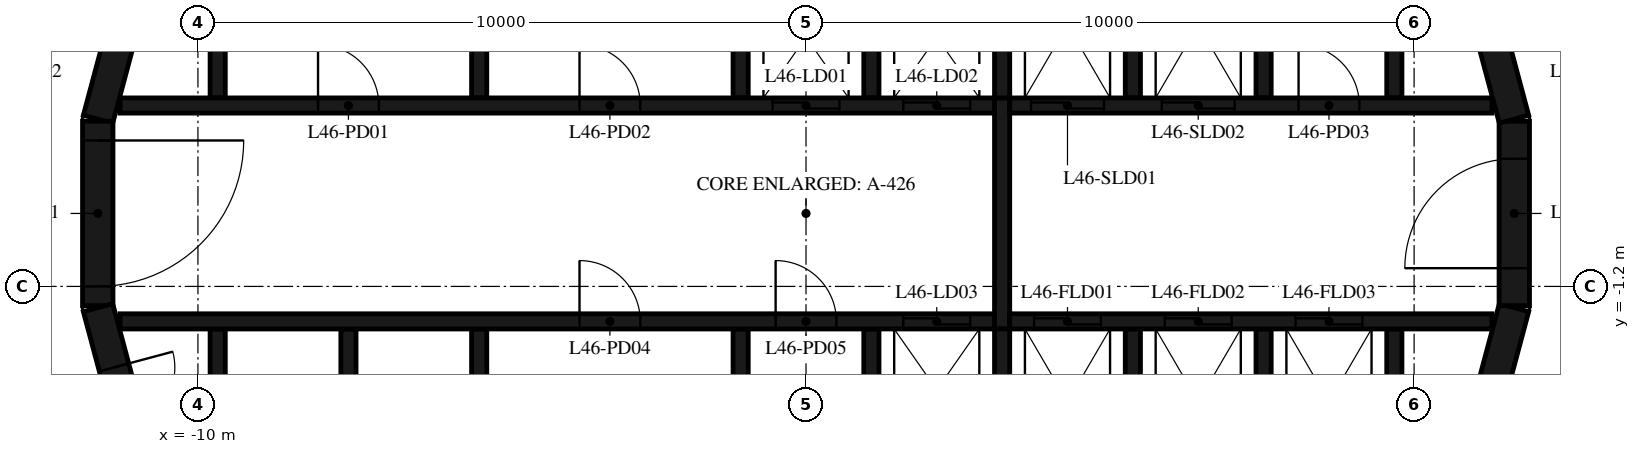
"""IFC4 building model, lengths in metres.
Left out: names, types, materials, properties, quantities, classifications, styles, units other than length and angle.
Written with IfcOpenShell. Run it as: python <this file> out.ifc"""

import sys

from ifc_helpers import new_model, si_unit, direction, frame, frame_2d, origin, place, context, subcontext, project, spatial, polyline, rectangle, outline, extrude, element, fill, save


model = new_model("IFC4")
c1 = context("Model", 3, precision=1e-05, world=origin(), true_north=direction((0.0, 1.0)))
c2 = subcontext(c1, "Body", "Model", "MODEL_VIEW")
j1 = project(units=[si_unit("LENGTHUNIT", "METRE"), si_unit("PLANEANGLEUNIT", "RADIAN")], contexts=[c1])
p1 = place(None, origin())
s1 = spatial("IfcSite", under=j1, at=p1, CompositionType="ELEMENT")
p2 = place(p1, origin())
s2 = spatial("IfcBuilding", under=s1, at=p2, CompositionType="ELEMENT")
p3 = place(p2, frame((0.0, 0.0, 183.2)))
s3 = spatial("IfcBuildingStorey", under=s2, at=p3, CompositionType="ELEMENT", Elevation=183.2)
p4 = place(p3, frame((10.858, -4.479, 0.0), z_axis=(0.0, 0.0, 1.0), x_axis=(0.258734743916, 0.965948410781, 0.0)))
e1 = element("IfcWall", 1, at=p4, inside=s3, PredefinedType="SHEAR", context=c2, shape_type="SweptSolid", body=[
    extrude(rectangle(XDim=3.033, YDim=0.5, at=frame_2d((1.516, 0.0))), origin(), (0.0, 0.0, 1.0), 4.75),
])
p5 = place(p3, frame((11.647, -1.516, 0.0), z_axis=(0.0, 0.0, 1.0), x_axis=(0.0, 1.0, 0.0)))
e2 = element("IfcWall", 2, at=p5, inside=s3, PredefinedType="SHEAR", context=c2, shape_type="SweptSolid", body=[
    extrude(rectangle(XDim=3.033, YDim=0.5, at=frame_2d((1.516, 0.0))), origin(), (0.0, 0.0, 1.0), 4.75),
])
p6 = place(p5, frame((0.616, 0.0, 0.0)))
e3 = element("IfcOpeningElement", 3, at=p6, cuts=e2, PredefinedType="OPENING", context=c2, shape_type="SweptSolid", body=[
    extrude(rectangle(XDim=1.8, YDim=2.1, at=frame_2d((0.9, 1.05))), frame((0.0, 0.26, 0.0), z_axis=(0.0, -1.0, 0.0), x_axis=(1.0, 0.0, 0.0)), (0.0, 0.0, 1.0), 0.52),
])
for number, where, z_axis, x_axis in (
    (4, (11.643, 1.55, 0.0), (0.0, 0.0, 1.0), (-0.259, 0.966, 0.0)),
    (5, (-10.858, 4.479, 0.0), (0.0, 0.0, 1.0), (-0.259, -0.966, 0.0)),
):
    element("IfcWall", number, at=place(p3, frame(where, z_axis=z_axis, x_axis=x_axis)), inside=s3, PredefinedType="SHEAR", context=c2, shape_type="SweptSolid", body=[
        extrude(rectangle(XDim=3.033, YDim=0.5, at=frame_2d((1.516, 0.0))), origin(), (0.0, 0.0, 1.0), 4.75),
    ])
p7 = place(p3, frame((-11.647, 1.516, 0.0), z_axis=(0.0, 0.0, 1.0), x_axis=(0.0, -1.0, 0.0)))
e6 = element("IfcWall", 6, at=p7, inside=s3, PredefinedType="SHEAR", context=c2, shape_type="SweptSolid", body=[
    extrude(rectangle(XDim=3.033, YDim=0.5, at=frame_2d((1.516, 0.0))), origin(), (0.0, 0.0, 1.0), 4.75),
])
p8 = place(p7, frame((0.316, 0.0, 0.0)))
e7 = element("IfcOpeningElement", 7, at=p8, cuts=e6, PredefinedType="OPENING", context=c2, shape_type="SweptSolid", body=[
    extrude(rectangle(XDim=2.4, YDim=2.1, at=frame_2d((1.2, 1.05))), frame((0.0, 0.26, 0.0), z_axis=(0.0, -1.0, 0.0), x_axis=(1.0, 0.0, 0.0)), (0.0, 0.0, 1.0), 0.52),
])
p9 = place(p3, frame((-11.643, -1.55, 0.0), z_axis=(0.0, 0.0, 1.0), x_axis=(0.258734743916, -0.965948410781, 0.0)))
e8 = element("IfcWall", 8, at=p9, inside=s3, PredefinedType="SHEAR", context=c2, shape_type="SweptSolid", body=[
    extrude(rectangle(XDim=3.033, YDim=0.5, at=frame_2d((1.516, 0.0))), origin(), (0.0, 0.0, 1.0), 4.75),
])
p10 = place(p9, frame((1.016, 0.0, 0.0)))
e9 = element("IfcOpeningElement", 9, at=p10, cuts=e8, PredefinedType="OPENING", context=c2, shape_type="SweptSolid", body=[
    extrude(rectangle(XDim=1.0, YDim=2.4, at=frame_2d((0.5, 1.2))), frame((0.0, 0.26, 0.0), z_axis=(0.0, -1.0, 0.0), x_axis=(1.0, 0.0, 0.0)), (0.0, 0.0, 1.0), 0.52),
])
p11 = place(p3, origin())
e10 = element("IfcWall", 10, at=p11, inside=s3, PredefinedType="SHEAR", context=c2, shape_type="SweptSolid", body=[
    extrude(outline(polyline([(-9.55, 4.8), (-5.5, 4.8), (-5.5, 1.9), (-5.25, 1.9), (-5.25, 4.8), (-1.2, 4.8), (-1.2, 1.9), (-0.95, 1.9), (-0.95, 4.8), (0.95, 4.8), (0.95, 1.9), (1.2, 1.9), (1.2, 4.8), (3.1, 4.8), (3.1, 1.9), (3.35, 1.9), (3.35, 4.8), (5.25, 4.8), (5.25, 1.9), (5.5, 1.9), (5.5, 4.8), (7.4, 4.8), (7.4, 1.9), (7.65, 1.9), (7.65, 4.8), (9.55, 4.8), (9.55, 1.9), (9.8, 1.9), (9.8, 4.8), (9.8, 5.05), (-9.8, 5.05), (-9.8, 4.8), (-9.8, 1.9), (-9.55, 1.9), (-9.55, 4.8)])), origin(), (0.0, 0.0, 1.0), 4.75),
])
p12 = place(p3, origin())
e11 = element("IfcWall", 11, at=p12, inside=s3, PredefinedType="SHEAR", context=c2, shape_type="SweptSolid", body=[
    extrude(outline(polyline([(9.8, -5.05), (9.8, -4.8), (9.8, -1.9), (9.55, -1.9), (9.55, -4.8), (7.65, -4.8), (7.65, -1.9), (7.4, -1.9), (7.4, -4.8), (5.5, -4.8), (5.5, -1.9), (5.25, -1.9), (5.25, -4.8), (3.35, -4.8), (3.35, -1.9), (3.1, -1.9), (3.1, -4.8), (1.2, -4.8), (1.2, -1.9), (0.95, -1.9), (0.95, -4.8), (-0.95, -4.8), (-0.95, -1.9), (-1.2, -1.9), (-1.2, -4.8), (-5.25, -4.8), (-5.25, -1.9), (-5.5, -1.9), (-5.5, -4.8), (-7.4, -4.8), (-7.4, -1.9), (-7.65, -1.9), (-7.65, -4.8), (-9.55, -4.8), (-9.55, -1.9), (-9.8, -1.9), (-9.8, -4.8), (-9.8, -5.05), (9.8, -5.05)])), origin(), (0.0, 0.0, 1.0), 4.75),
])
p13 = place(p3, frame((-11.28, 1.775, 0.0), z_axis=(0.0, 0.0, 1.0), x_axis=(1.0, 0.0, 0.0)))
e12 = element("IfcWall", 12, at=p13, inside=s3, PredefinedType="SHEAR", context=c2, shape_type="SweptSolid", body=[
    extrude(rectangle(XDim=14.38, YDim=0.25, at=frame_2d((7.19, 0.0))), origin(), (0.0, 0.0, 1.0), 4.75),
])
p14 = place(p13, frame((10.73, 0.0, 0.0)))
e13 = element("IfcOpeningElement", 13, at=p14, cuts=e12, PredefinedType="OPENING", context=c2, shape_type="SweptSolid", body=[
    extrude(rectangle(XDim=1.1, YDim=2.1, at=frame_2d((0.55, 1.05))), frame((0.0, 0.135, 0.0), z_axis=(0.0, -1.0, 0.0), x_axis=(1.0, 0.0, 0.0)), (0.0, 0.0, 1.0), 0.27),
])
p15 = place(p13, frame((12.88, 0.0, 0.0)))
e14 = element("IfcOpeningElement", 14, at=p15, cuts=e12, PredefinedType="OPENING", context=c2, shape_type="SweptSolid", body=[
    extrude(rectangle(XDim=1.1, YDim=2.1, at=frame_2d((0.55, 1.05))), frame((0.0, 0.135, 0.0), z_axis=(0.0, -1.0, 0.0), x_axis=(1.0, 0.0, 0.0)), (0.0, 0.0, 1.0), 0.27),
])
p16 = place(p13, frame((3.255, 0.0, 0.0)))
e15 = element("IfcOpeningElement", 15, at=p16, cuts=e12, PredefinedType="OPENING", context=c2, shape_type="SweptSolid", body=[
    extrude(rectangle(XDim=1.0, YDim=2.4, at=frame_2d((0.5, 1.2))), frame((0.0, 0.135, 0.0), z_axis=(0.0, -1.0, 0.0), x_axis=(1.0, 0.0, 0.0)), (0.0, 0.0, 1.0), 0.27),
])
p17 = place(p13, frame((7.555, 0.0, 0.0)))
e16 = element("IfcOpeningElement", 16, at=p17, cuts=e12, PredefinedType="OPENING", context=c2, shape_type="SweptSolid", body=[
    extrude(rectangle(XDim=1.0, YDim=2.4, at=frame_2d((0.5, 1.2))), frame((0.0, 0.135, 0.0), z_axis=(0.0, -1.0, 0.0), x_axis=(1.0, 0.0, 0.0)), (0.0, 0.0, 1.0), 0.27),
])
p18 = place(p3, frame((3.35, 1.775, 0.0), z_axis=(0.0, 0.0, 1.0), x_axis=(1.0, 0.0, 0.0)))
e17 = element("IfcWall", 17, at=p18, inside=s3, PredefinedType="SHEAR", context=c2, shape_type="SweptSolid", body=[
    extrude(rectangle(XDim=7.93, YDim=0.25, at=frame_2d((3.965, 0.0))), origin(), (0.0, 0.0, 1.0), 4.75),
])
p19 = place(p18, frame((0.35, 0.0, 0.0)))
e18 = element("IfcOpeningElement", 18, at=p19, cuts=e17, PredefinedType="OPENING", context=c2, shape_type="SweptSolid", body=[
    extrude(rectangle(XDim=1.2, YDim=2.4, at=frame_2d((0.6, 1.2))), frame((0.0, 0.135, 0.0), z_axis=(0.0, -1.0, 0.0), x_axis=(1.0, 0.0, 0.0)), (0.0, 0.0, 1.0), 0.27),
])
p20 = place(p18, frame((2.5, 0.0, 0.0)))
e19 = element("IfcOpeningElement", 19, at=p20, cuts=e17, PredefinedType="OPENING", context=c2, shape_type="SweptSolid", body=[
    extrude(rectangle(XDim=1.2, YDim=2.4, at=frame_2d((0.6, 1.2))), frame((0.0, 0.135, 0.0), z_axis=(0.0, -1.0, 0.0), x_axis=(1.0, 0.0, 0.0)), (0.0, 0.0, 1.0), 0.27),
])
p21 = place(p18, frame((4.75, 0.0, 0.0)))
e20 = element("IfcOpeningElement", 20, at=p21, cuts=e17, PredefinedType="OPENING", context=c2, shape_type="SweptSolid", body=[
    extrude(rectangle(XDim=1.0, YDim=2.4, at=frame_2d((0.5, 1.2))), frame((0.0, 0.135, 0.0), z_axis=(0.0, -1.0, 0.0), x_axis=(1.0, 0.0, 0.0)), (0.0, 0.0, 1.0), 0.27),
])
p22 = place(p3, frame((-11.28, -1.775, 0.0), z_axis=(0.0, 0.0, 1.0), x_axis=(1.0, 0.0, 0.0)))
e21 = element("IfcWall", 21, at=p22, inside=s3, PredefinedType="SHEAR", context=c2, shape_type="SweptSolid", body=[
    extrude(rectangle(XDim=14.38, YDim=0.25, at=frame_2d((7.19, 0.0))), origin(), (0.0, 0.0, 1.0), 4.75),
])
p23 = place(p22, frame((12.88, 0.0, 0.0)))
e22 = element("IfcOpeningElement", 22, at=p23, cuts=e21, PredefinedType="OPENING", context=c2, shape_type="SweptSolid", body=[
    extrude(rectangle(XDim=1.1, YDim=2.1, at=frame_2d((0.55, 1.05))), frame((0.0, 0.135, 0.0), z_axis=(0.0, -1.0, 0.0), x_axis=(1.0, 0.0, 0.0)), (0.0, 0.0, 1.0), 0.27),
])
p24 = place(p22, frame((7.555, 0.0, 0.0)))
e23 = element("IfcOpeningElement", 23, at=p24, cuts=e21, PredefinedType="OPENING", context=c2, shape_type="SweptSolid", body=[
    extrude(rectangle(XDim=1.0, YDim=2.4, at=frame_2d((0.5, 1.2))), frame((0.0, 0.135, 0.0), z_axis=(0.0, -1.0, 0.0), x_axis=(1.0, 0.0, 0.0)), (0.0, 0.0, 1.0), 0.27),
])
p25 = place(p22, frame((10.78, 0.0, 0.0)))
e24 = element("IfcOpeningElement", 24, at=p25, cuts=e21, PredefinedType="OPENING", context=c2, shape_type="SweptSolid", body=[
    extrude(rectangle(XDim=1.0, YDim=2.4, at=frame_2d((0.5, 1.2))), frame((0.0, 0.135, 0.0), z_axis=(0.0, -1.0, 0.0), x_axis=(1.0, 0.0, 0.0)), (0.0, 0.0, 1.0), 0.27),
])
p26 = place(p3, frame((3.35, -1.775, 0.0), z_axis=(0.0, 0.0, 1.0), x_axis=(1.0, 0.0, 0.0)))
e25 = element("IfcWall", 25, at=p26, inside=s3, PredefinedType="SHEAR", context=c2, shape_type="SweptSolid", body=[
    extrude(rectangle(XDim=7.93, YDim=0.25, at=frame_2d((3.965, 0.0))), origin(), (0.0, 0.0, 1.0), 4.75),
])
p27 = place(p26, frame((0.4, 0.0, 0.0)))
e26 = element("IfcOpeningElement", 26, at=p27, cuts=e25, PredefinedType="OPENING", context=c2, shape_type="SweptSolid", body=[
    extrude(rectangle(XDim=1.1, YDim=2.4, at=frame_2d((0.55, 1.2))), frame((0.0, 0.135, 0.0), z_axis=(0.0, -1.0, 0.0), x_axis=(1.0, 0.0, 0.0)), (0.0, 0.0, 1.0), 0.27),
])
p28 = place(p26, frame((2.55, 0.0, 0.0)))
e27 = element("IfcOpeningElement", 27, at=p28, cuts=e25, PredefinedType="OPENING", context=c2, shape_type="SweptSolid", body=[
    extrude(rectangle(XDim=1.1, YDim=2.4, at=frame_2d((0.55, 1.2))), frame((0.0, 0.135, 0.0), z_axis=(0.0, -1.0, 0.0), x_axis=(1.0, 0.0, 0.0)), (0.0, 0.0, 1.0), 0.27),
])
p29 = place(p26, frame((4.7, 0.0, 0.0)))
e28 = element("IfcOpeningElement", 28, at=p29, cuts=e25, PredefinedType="OPENING", context=c2, shape_type="SweptSolid", body=[
    extrude(rectangle(XDim=1.1, YDim=2.4, at=frame_2d((0.55, 1.2))), frame((0.0, 0.135, 0.0), z_axis=(0.0, -1.0, 0.0), x_axis=(1.0, 0.0, 0.0)), (0.0, 0.0, 1.0), 0.27),
])
p30 = place(p3, frame((3.225, -1.9, 0.0), z_axis=(0.0, 0.0, 1.0), x_axis=(0.0, 1.0, 0.0)))
e29 = element("IfcWall", 29, at=p30, inside=s3, PredefinedType="SHEAR", context=c2, shape_type="SweptSolid", body=[
    extrude(rectangle(XDim=3.8, YDim=0.25, at=frame_2d((1.9, 0.0))), origin(), (0.0, 0.0, 1.0), 4.75),
])
p31 = place(p8, origin())
e30 = element("IfcDoor", 30, at=p31, inside=s3, OperationType="DOUBLE_DOOR_SINGLE_SWING", PredefinedType="DOOR", context=c2, shape_type="SweptSolid", body=[
    extrude(rectangle(XDim=2.4, YDim=2.1, at=frame_2d((1.2, 1.05))), frame((0.0, 0.025, 0.0), z_axis=(0.0, -1.0, 0.0), x_axis=(1.0, 0.0, 0.0)), (0.0, 0.0, 1.0), 0.05),
])
fill(e7, e30)
p32 = place(p6, origin())
e31 = element("IfcDoor", 31, at=p32, inside=s3, OperationType="DOUBLE_DOOR_SINGLE_SWING", PredefinedType="DOOR", context=c2, shape_type="SweptSolid", body=[
    extrude(rectangle(XDim=1.8, YDim=2.1, at=frame_2d((0.9, 1.05))), frame((0.0, 0.025, 0.0), z_axis=(0.0, -1.0, 0.0), x_axis=(1.0, 0.0, 0.0)), (0.0, 0.0, 1.0), 0.05),
])
fill(e3, e31)
p33 = place(p14, origin())
e32 = element("IfcDoor", 32, at=p33, inside=s3, OperationType="DOUBLE_DOOR_SLIDING", PredefinedType="DOOR", context=c2, shape_type="SweptSolid", body=[
    extrude(rectangle(XDim=1.1, YDim=2.1, at=frame_2d((0.55, 1.05))), frame((0.0, 0.025, 0.0), z_axis=(0.0, -1.0, 0.0), x_axis=(1.0, 0.0, 0.0)), (0.0, 0.0, 1.0), 0.05),
])
fill(e13, e32)
p34 = place(p15, origin())
e33 = element("IfcDoor", 33, at=p34, inside=s3, OperationType="DOUBLE_DOOR_SLIDING", PredefinedType="DOOR", context=c2, shape_type="SweptSolid", body=[
    extrude(rectangle(XDim=1.1, YDim=2.1, at=frame_2d((0.55, 1.05))), frame((0.0, 0.025, 0.0), z_axis=(0.0, -1.0, 0.0), x_axis=(1.0, 0.0, 0.0)), (0.0, 0.0, 1.0), 0.05),
])
fill(e14, e33)
p35 = place(p19, origin())
e34 = element("IfcDoor", 34, at=p35, inside=s3, OperationType="DOUBLE_DOOR_SLIDING", PredefinedType="DOOR", context=c2, shape_type="SweptSolid", body=[
    extrude(rectangle(XDim=1.2, YDim=2.4, at=frame_2d((0.6, 1.2))), frame((0.0, 0.025, 0.0), z_axis=(0.0, -1.0, 0.0), x_axis=(1.0, 0.0, 0.0)), (0.0, 0.0, 1.0), 0.05),
])
fill(e18, e34)
p36 = place(p20, origin())
e35 = element("IfcDoor", 35, at=p36, inside=s3, OperationType="DOUBLE_DOOR_SLIDING", PredefinedType="DOOR", context=c2, shape_type="SweptSolid", body=[
    extrude(rectangle(XDim=1.2, YDim=2.4, at=frame_2d((0.6, 1.2))), frame((0.0, 0.025, 0.0), z_axis=(0.0, -1.0, 0.0), x_axis=(1.0, 0.0, 0.0)), (0.0, 0.0, 1.0), 0.05),
])
fill(e19, e35)
p37 = place(p23, origin())
e36 = element("IfcDoor", 36, at=p37, inside=s3, OperationType="DOUBLE_DOOR_SLIDING", PredefinedType="DOOR", context=c2, shape_type="SweptSolid", body=[
    extrude(rectangle(XDim=1.1, YDim=2.1, at=frame_2d((0.55, 1.05))), frame((0.0, 0.025, 0.0), z_axis=(0.0, -1.0, 0.0), x_axis=(1.0, 0.0, 0.0)), (0.0, 0.0, 1.0), 0.05),
])
fill(e22, e36)
p38 = place(p27, origin())
e37 = element("IfcDoor", 37, at=p38, inside=s3, OperationType="DOUBLE_DOOR_SLIDING", PredefinedType="DOOR", context=c2, shape_type="SweptSolid", body=[
    extrude(rectangle(XDim=1.1, YDim=2.4, at=frame_2d((0.55, 1.2))), frame((0.0, 0.025, 0.0), z_axis=(0.0, -1.0, 0.0), x_axis=(1.0, 0.0, 0.0)), (0.0, 0.0, 1.0), 0.05),
])
fill(e26, e37)
p39 = place(p28, origin())
e38 = element("IfcDoor", 38, at=p39, inside=s3, OperationType="DOUBLE_DOOR_SLIDING", PredefinedType="DOOR", context=c2, shape_type="SweptSolid", body=[
    extrude(rectangle(XDim=1.1, YDim=2.4, at=frame_2d((0.55, 1.2))), frame((0.0, 0.025, 0.0), z_axis=(0.0, -1.0, 0.0), x_axis=(1.0, 0.0, 0.0)), (0.0, 0.0, 1.0), 0.05),
])
fill(e27, e38)
p40 = place(p29, origin())
e39 = element("IfcDoor", 39, at=p40, inside=s3, OperationType="DOUBLE_DOOR_SLIDING", PredefinedType="DOOR", context=c2, shape_type="SweptSolid", body=[
    extrude(rectangle(XDim=1.1, YDim=2.4, at=frame_2d((0.55, 1.2))), frame((0.0, 0.025, 0.0), z_axis=(0.0, -1.0, 0.0), x_axis=(1.0, 0.0, 0.0)), (0.0, 0.0, 1.0), 0.05),
])
fill(e28, e39)
p41 = place(p16, origin())
e40 = element("IfcDoor", 40, at=p41, inside=s3, OperationType="SINGLE_SWING_LEFT", PredefinedType="DOOR", context=c2, shape_type="SweptSolid", body=[
    extrude(rectangle(XDim=1.0, YDim=2.4, at=frame_2d((0.5, 1.2))), frame((0.0, 0.025, 0.0), z_axis=(0.0, -1.0, 0.0), x_axis=(1.0, 0.0, 0.0)), (0.0, 0.0, 1.0), 0.05),
])
fill(e15, e40)
p42 = place(p17, origin())
e41 = element("IfcDoor", 41, at=p42, inside=s3, OperationType="SINGLE_SWING_RIGHT", PredefinedType="DOOR", context=c2, shape_type="SweptSolid", body=[
    extrude(rectangle(XDim=1.0, YDim=2.4, at=frame_2d((0.5, 1.2))), frame((0.0, 0.025, 0.0), z_axis=(0.0, -1.0, 0.0), x_axis=(1.0, 0.0, 0.0)), (0.0, 0.0, 1.0), 0.05),
])
fill(e16, e41)
p43 = place(p21, origin())
e42 = element("IfcDoor", 42, at=p43, inside=s3, OperationType="SINGLE_SWING_LEFT", PredefinedType="DOOR", context=c2, shape_type="SweptSolid", body=[
    extrude(rectangle(XDim=1.0, YDim=2.4, at=frame_2d((0.5, 1.2))), frame((0.0, 0.025, 0.0), z_axis=(0.0, -1.0, 0.0), x_axis=(1.0, 0.0, 0.0)), (0.0, 0.0, 1.0), 0.05),
])
fill(e20, e42)
p44 = place(p24, origin())
e43 = element("IfcDoor", 43, at=p44, inside=s3, OperationType="SINGLE_SWING_RIGHT", PredefinedType="DOOR", context=c2, shape_type="SweptSolid", body=[
    extrude(rectangle(XDim=1.0, YDim=2.4, at=frame_2d((0.5, 1.2))), frame((0.0, 0.025, 0.0), z_axis=(0.0, -1.0, 0.0), x_axis=(1.0, 0.0, 0.0)), (0.0, 0.0, 1.0), 0.05),
])
fill(e23, e43)
p45 = place(p25, origin())
e44 = element("IfcDoor", 44, at=p45, inside=s3, OperationType="SINGLE_SWING_LEFT", PredefinedType="DOOR", context=c2, shape_type="SweptSolid", body=[
    extrude(rectangle(XDim=1.0, YDim=2.4, at=frame_2d((0.5, 1.2))), frame((0.0, 0.025, 0.0), z_axis=(0.0, -1.0, 0.0), x_axis=(1.0, 0.0, 0.0)), (0.0, 0.0, 1.0), 0.05),
])
fill(e24, e44)
p46 = place(p10, origin())
e45 = element("IfcDoor", 45, at=p46, inside=s3, OperationType="SINGLE_SWING_RIGHT", PredefinedType="DOOR", context=c2, shape_type="SweptSolid", body=[
    extrude(rectangle(XDim=1.0, YDim=2.4, at=frame_2d((0.5, 1.2))), frame((0.0, 0.025, 0.0), z_axis=(0.0, -1.0, 0.0), x_axis=(1.0, 0.0, 0.0)), (0.0, 0.0, 1.0), 0.05),
])
fill(e9, e45)
save(model, sys.argv[1])
